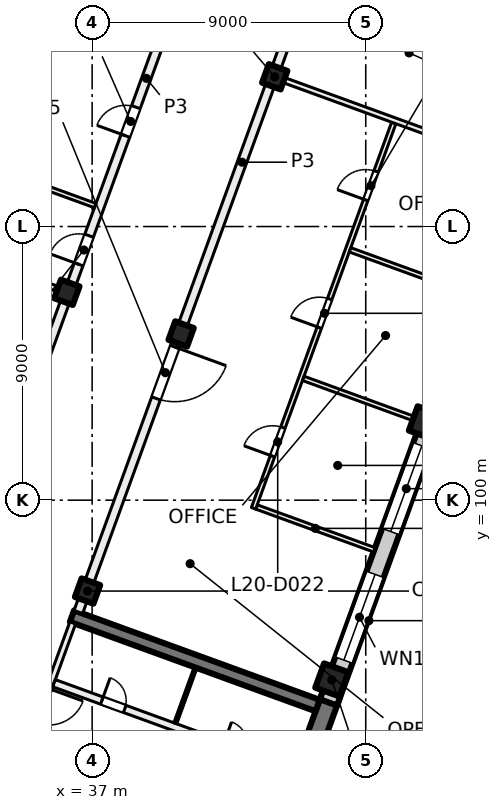
"""IFC4 building model, lengths in metres.
Left out: names, types, materials, properties, quantities, classifications, styles, units other than length and angle.
Written with IfcOpenShell. Run it as: python <this file> out.ifc"""

import sys

from ifc_helpers import new_model, si_unit, direction, frame, frame_2d, origin, origin_2d, place, context, subcontext, project, spatial, rectangle, extrude, element, fill, save


model = new_model("IFC4")
c1 = context("Model", 3, precision=1e-05, world=origin(), true_north=direction((0.0, 1.0)))
c2 = subcontext(c1, "Body", "Model", "MODEL_VIEW")
j1 = project(units=[si_unit("LENGTHUNIT", "METRE"), si_unit("PLANEANGLEUNIT", "RADIAN")], contexts=[c1])
p1 = place(None, origin())
s1 = spatial("IfcSite", under=j1, at=p1, CompositionType="ELEMENT")
p2 = place(p1, origin())
s2 = spatial("IfcBuilding", under=s1, at=p2, CompositionType="ELEMENT")
p3 = place(p2, frame((0.0, 0.0, 89.0)))
s3 = spatial("IfcBuildingStorey", under=s2, at=p3, CompositionType="ELEMENT", Elevation=89.0)
for number, where, z_axis, x_axis in (
    (1, (43.006, 113.925, 0.0), (0.0, 0.0, 1.0), (-0.342, -0.94, 0.0)),
    (2, (39.927, 105.468, 0.0), (0.0, 0.0, 1.0), (-0.342, -0.94, 0.0)),
    (3, (36.849, 97.011, 0.0), (0.0, 0.0, 1.0), (-0.342, -0.94, 0.0)),
    (4, (36.169, 106.836, 0.0), (0.0, 0.0, 1.0), (-0.342, -0.94, 0.0)),
):
    element("IfcColumn", number, at=place(p3, frame(where, z_axis=z_axis, x_axis=x_axis)), inside=s3, PredefinedType="COLUMN", context=c2, shape_type="SweptSolid", body=[
        extrude(rectangle(XDim=0.65, YDim=0.65, at=origin_2d()), origin(), (0.0, 0.0, 1.0), 4.0),
    ])
for number, where, z_axis, x_axis in (
    (5, (47.962, 102.544, 0.0), (0.0, 0.0, 1.0), (-0.342, -0.94, 0.0)),
    (6, (44.884, 94.087, 0.0), (0.0, 0.0, 1.0), (-0.342, -0.94, 0.0)),
):
    element("IfcColumn", number, at=place(p3, frame(where, z_axis=z_axis, x_axis=x_axis)), inside=s3, PredefinedType="COLUMN", context=c2, shape_type="SweptSolid", body=[
        extrude(rectangle(XDim=0.85, YDim=0.85, at=origin_2d()), origin(), (0.0, 0.0, 1.0), 4.0),
    ])
p4 = place(p3, frame((41.827, 85.249, 0.0), z_axis=(0.0, 0.0, 1.0), x_axis=(0.342017595281, 0.939693548195, 0.0)))
e7 = element("IfcWall", 7, at=p4, inside=s3, PredefinedType="SHEAR", context=c2, shape_type="SweptSolid", body=[
    extrude(rectangle(XDim=8.925, YDim=0.6, at=frame_2d((4.462, 0.0))), origin(), (0.0, 0.0, 1.0), 4.0),
])
p5 = place(p3, frame((44.418, 93.245, 0.0), z_axis=(0.0, 0.0, 1.0), x_axis=(-0.93969060187, 0.342025690201, 0.0)))
e8 = element("IfcWall", 8, at=p5, inside=s3, PredefinedType="SHEAR", context=c2, shape_type="SweptSolid", body=[
    extrude(rectangle(XDim=8.6, YDim=0.4, at=frame_2d((4.3, 0.0))), origin(), (0.0, 0.0, 1.0), 4.0),
])
p6 = place(p3, frame((52.212, 113.783, 0.0), z_axis=(0.0, 0.0, 1.0), x_axis=(-0.34202521188, -0.939690775968, 0.0)))
e9 = element("IfcWall", 9, at=p6, inside=s3, PredefinedType="SOLIDWALL", context=c2, shape_type="SweptSolid", body=[
    extrude(rectangle(XDim=21.745, YDim=0.6, at=frame_2d((10.873, 0.0))), origin(), (0.0, 0.0, 1.0), 3.625),
])
p7 = place(p6, frame((3.765, 0.0, 0.9)))
e10 = element("IfcOpeningElement", 10, at=p7, cuts=e9, PredefinedType="OPENING", context=c2, shape_type="SweptSolid", body=[
    extrude(rectangle(XDim=3.0, YDim=2.4, at=frame_2d((1.5, 1.2))), frame((0.0, 0.31, 0.0), z_axis=(0.0, -1.0, 0.0), x_axis=(1.0, 0.0, 0.0)), (0.0, 0.0, 1.0), 0.62),
])
p8 = place(p6, frame((8.265, 0.0, 0.9)))
e11 = element("IfcOpeningElement", 11, at=p8, cuts=e9, PredefinedType="OPENING", context=c2, shape_type="SweptSolid", body=[
    extrude(rectangle(XDim=3.0, YDim=2.4, at=frame_2d((1.5, 1.2))), frame((0.0, 0.31, 0.0), z_axis=(0.0, -1.0, 0.0), x_axis=(1.0, 0.0, 0.0)), (0.0, 0.0, 1.0), 0.62),
])
p9 = place(p6, frame((12.765, 0.0, 0.9)))
e12 = element("IfcOpeningElement", 12, at=p9, cuts=e9, PredefinedType="OPENING", context=c2, shape_type="SweptSolid", body=[
    extrude(rectangle(XDim=3.0, YDim=2.4, at=frame_2d((1.5, 1.2))), frame((0.0, 0.31, 0.0), z_axis=(0.0, -1.0, 0.0), x_axis=(1.0, 0.0, 0.0)), (0.0, 0.0, 1.0), 0.62),
])
p10 = place(p6, frame((17.265, 0.0, 0.9)))
e13 = element("IfcOpeningElement", 13, at=p10, cuts=e9, PredefinedType="OPENING", context=c2, shape_type="SweptSolid", body=[
    extrude(rectangle(XDim=3.0, YDim=2.4, at=frame_2d((1.5, 1.2))), frame((0.0, 0.31, 0.0), z_axis=(0.0, -1.0, 0.0), x_axis=(1.0, 0.0, 0.0)), (0.0, 0.0, 1.0), 0.62),
])
p11 = place(p3, frame((24.666, 100.669, 0.0), z_axis=(0.0, 0.0, 1.0), x_axis=(0.34201964167, 0.939692803373, 0.0)))
e14 = element("IfcWall", 14, at=p11, inside=s3, PredefinedType="SOLIDWALL", context=c2, shape_type="SweptSolid", body=[
    extrude(rectangle(XDim=32.884, YDim=0.6, at=frame_2d((16.442, 0.0))), origin(), (0.0, 0.0, 1.0), 3.625),
])
p12 = place(p11, frame((1.48, 0.0, 0.9)))
e15 = element("IfcOpeningElement", 15, at=p12, cuts=e14, PredefinedType="OPENING", context=c2, shape_type="SweptSolid", body=[
    extrude(rectangle(XDim=3.0, YDim=2.4, at=frame_2d((1.5, 1.2))), frame((0.0, 0.31, 0.0), z_axis=(0.0, -1.0, 0.0), x_axis=(1.0, 0.0, 0.0)), (0.0, 0.0, 1.0), 0.62),
])
p13 = place(p11, frame((5.98, 0.0, 0.9)))
e16 = element("IfcOpeningElement", 16, at=p13, cuts=e14, PredefinedType="OPENING", context=c2, shape_type="SweptSolid", body=[
    extrude(rectangle(XDim=3.0, YDim=2.4, at=frame_2d((1.5, 1.2))), frame((0.0, 0.31, 0.0), z_axis=(0.0, -1.0, 0.0), x_axis=(1.0, 0.0, 0.0)), (0.0, 0.0, 1.0), 0.62),
])
p14 = place(p11, frame((10.48, 0.0, 0.9)))
e17 = element("IfcOpeningElement", 17, at=p14, cuts=e14, PredefinedType="OPENING", context=c2, shape_type="SweptSolid", body=[
    extrude(rectangle(XDim=3.0, YDim=2.4, at=frame_2d((1.5, 1.2))), frame((0.0, 0.31, 0.0), z_axis=(0.0, -1.0, 0.0), x_axis=(1.0, 0.0, 0.0)), (0.0, 0.0, 1.0), 0.62),
])
p15 = place(p11, frame((14.98, 0.0, 0.9)))
e18 = element("IfcOpeningElement", 18, at=p15, cuts=e14, PredefinedType="OPENING", context=c2, shape_type="SweptSolid", body=[
    extrude(rectangle(XDim=3.0, YDim=2.4, at=frame_2d((1.5, 1.2))), frame((0.0, 0.31, 0.0), z_axis=(0.0, -1.0, 0.0), x_axis=(1.0, 0.0, 0.0)), (0.0, 0.0, 1.0), 0.62),
])
p16 = place(p11, frame((19.48, 0.0, 0.9)))
e19 = element("IfcOpeningElement", 19, at=p16, cuts=e14, PredefinedType="OPENING", context=c2, shape_type="SweptSolid", body=[
    extrude(rectangle(XDim=3.0, YDim=2.4, at=frame_2d((1.5, 1.2))), frame((0.0, 0.31, 0.0), z_axis=(0.0, -1.0, 0.0), x_axis=(1.0, 0.0, 0.0)), (0.0, 0.0, 1.0), 0.62),
])
p17 = place(p11, frame((23.98, 0.0, 0.9)))
e20 = element("IfcOpeningElement", 20, at=p17, cuts=e14, PredefinedType="OPENING", context=c2, shape_type="SweptSolid", body=[
    extrude(rectangle(XDim=3.0, YDim=2.4, at=frame_2d((1.5, 1.2))), frame((0.0, 0.31, 0.0), z_axis=(0.0, -1.0, 0.0), x_axis=(1.0, 0.0, 0.0)), (0.0, 0.0, 1.0), 0.62),
])
p18 = place(p11, frame((28.48, 0.0, 0.9)))
e21 = element("IfcOpeningElement", 21, at=p18, cuts=e14, PredefinedType="OPENING", context=c2, shape_type="SweptSolid", body=[
    extrude(rectangle(XDim=3.0, YDim=2.4, at=frame_2d((1.5, 1.2))), frame((0.0, 0.31, 0.0), z_axis=(0.0, -1.0, 0.0), x_axis=(1.0, 0.0, 0.0)), (0.0, 0.0, 1.0), 0.62),
])
p19 = place(p3, frame((36.362, 95.964, 0.0), z_axis=(0.0, 0.0, 1.0), x_axis=(-0.341995824804, -0.939701471648, 0.0)))
e22 = element("IfcWall", 22, at=p19, inside=s3, PredefinedType="PARTITIONING", context=c2, shape_type="SweptSolid", body=[
    extrude(rectangle(XDim=3.8, YDim=0.2, at=frame_2d((1.9, 0.0))), origin(), (0.0, 0.0, 1.0), 3.625),
])
p20 = place(p19, frame((2.3, 0.0, 0.0)))
e23 = element("IfcOpeningElement", 23, at=p20, cuts=e22, PredefinedType="OPENING", context=c2, shape_type="SweptSolid", body=[
    extrude(rectangle(XDim=1.2, YDim=2.1, at=frame_2d((0.6, 1.05))), frame((0.0, 0.11, 0.0), z_axis=(0.0, -1.0, 0.0), x_axis=(1.0, 0.0, 0.0)), (0.0, 0.0, 1.0), 0.22),
])
p21 = place(p3, frame((35.19, 92.453, 0.0), z_axis=(0.0, 0.0, 1.0), x_axis=(0.939691552312, -0.342023078919, 0.0)))
e24 = element("IfcWall", 24, at=p21, inside=s3, PredefinedType="PARTITIONING", context=c2, shape_type="SweptSolid", body=[
    extrude(rectangle(XDim=8.4, YDim=0.2, at=frame_2d((4.2, 0.0))), origin(), (0.0, 0.0, 1.0), 3.625),
])
p22 = place(p21, frame((5.25, 0.0, 0.0)))
e25 = element("IfcOpeningElement", 25, at=p22, cuts=e24, PredefinedType="OPENING", context=c2, shape_type="SweptSolid", body=[
    extrude(rectangle(XDim=1.5, YDim=2.1, at=frame_2d((0.75, 1.05))), frame((0.0, 0.11, 0.0), z_axis=(0.0, -1.0, 0.0), x_axis=(1.0, 0.0, 0.0)), (0.0, 0.0, 1.0), 0.22),
])
p23 = place(p3, frame((35.746, 93.98, 0.0), z_axis=(0.0, 0.0, 1.0), x_axis=(0.939691552312, -0.342023078919, 0.0)))
e26 = element("IfcWall", 26, at=p23, inside=s3, PredefinedType="PARTITIONING", context=c2, shape_type="SweptSolid", body=[
    extrude(rectangle(XDim=8.4, YDim=0.25, at=frame_2d((4.2, 0.0))), origin(), (0.0, 0.0, 1.0), 3.625),
])
p24 = place(p23, frame((1.675, 0.0, 0.0)))
e27 = element("IfcOpeningElement", 27, at=p24, cuts=e26, PredefinedType="OPENING", context=c2, shape_type="SweptSolid", body=[
    extrude(rectangle(XDim=0.8, YDim=2.1, at=frame_2d((0.4, 1.05))), frame((0.0, 0.135, 0.0), z_axis=(0.0, -1.0, 0.0), x_axis=(1.0, 0.0, 0.0)), (0.0, 0.0, 1.0), 0.27),
])
p25 = place(p23, frame((5.925, 0.0, 0.0)))
e28 = element("IfcOpeningElement", 28, at=p25, cuts=e26, PredefinedType="OPENING", context=c2, shape_type="SweptSolid", body=[
    extrude(rectangle(XDim=0.8, YDim=2.1, at=frame_2d((0.4, 1.05))), frame((0.0, 0.135, 0.0), z_axis=(0.0, -1.0, 0.0), x_axis=(1.0, 0.0, 0.0)), (0.0, 0.0, 1.0), 0.27),
])
p26 = place(p3, frame((40.403, 94.494, 0.0), z_axis=(0.0, 0.0, 1.0), x_axis=(-0.342064742067, -0.939676386973, 0.0)))
e29 = element("IfcWall", 29, at=p26, inside=s3, PredefinedType="PARTITIONING", context=c2, shape_type="SweptSolid", body=[
    extrude(rectangle(XDim=1.95, YDim=0.1, at=frame_2d((0.975, 0.0))), origin(), (0.0, 0.0, 1.0), 3.625),
])
p27 = place(p3, frame((32.63, 108.124, 0.0), z_axis=(0.0, 0.0, 1.0), x_axis=(0.939692277825, -0.342021085601, 0.0)))
e30 = element("IfcWall", 30, at=p27, inside=s3, PredefinedType="PARTITIONING", context=c2, shape_type="SweptSolid", body=[
    extrude(rectangle(XDim=3.666, YDim=0.175, at=frame_2d((1.833, 0.0))), origin(), (0.0, 0.0, 1.0), 3.625),
])
p28 = place(p3, frame((32.881, 97.657, 0.0), z_axis=(0.0, 0.0, 1.0), x_axis=(0.342017360004, 0.939693633828, 0.0)))
e31 = element("IfcWall", 31, at=p28, inside=s3, PredefinedType="PARTITIONING", context=c2, shape_type="SweptSolid", body=[
    extrude(rectangle(XDim=34.516, YDim=0.3, at=frame_2d((17.258, 0.0))), origin(), (0.0, 0.0, 1.0), 3.625),
])
p29 = place(p28, frame((4.275, 0.0, 0.0)))
e32 = element("IfcOpeningElement", 32, at=p29, cuts=e31, PredefinedType="OPENING", context=c2, shape_type="SweptSolid", body=[
    extrude(rectangle(XDim=1.2, YDim=2.1, at=frame_2d((0.6, 1.05))), frame((0.0, 0.16, 0.0), z_axis=(0.0, -1.0, 0.0), x_axis=(1.0, 0.0, 0.0)), (0.0, 0.0, 1.0), 0.32),
])
p30 = place(p28, frame((10.75, 0.0, 0.0)))
e33 = element("IfcOpeningElement", 33, at=p30, cuts=e31, PredefinedType="OPENING", context=c2, shape_type="SweptSolid", body=[
    extrude(rectangle(XDim=1.0, YDim=2.1, at=frame_2d((0.5, 1.05))), frame((0.0, 0.16, 0.0), z_axis=(0.0, -1.0, 0.0), x_axis=(1.0, 0.0, 0.0)), (0.0, 0.0, 1.0), 0.32),
])
p31 = place(p28, frame((15.25, 0.0, 0.0)))
e34 = element("IfcOpeningElement", 34, at=p31, cuts=e31, PredefinedType="OPENING", context=c2, shape_type="SweptSolid", body=[
    extrude(rectangle(XDim=1.0, YDim=2.1, at=frame_2d((0.5, 1.05))), frame((0.0, 0.16, 0.0), z_axis=(0.0, -1.0, 0.0), x_axis=(1.0, 0.0, 0.0)), (0.0, 0.0, 1.0), 0.32),
])
p32 = place(p28, frame((20.4, 0.0, 0.0)))
e35 = element("IfcOpeningElement", 35, at=p32, cuts=e31, PredefinedType="OPENING", context=c2, shape_type="SweptSolid", body=[
    extrude(rectangle(XDim=1.2, YDim=2.1, at=frame_2d((0.6, 1.05))), frame((0.0, 0.16, 0.0), z_axis=(0.0, -1.0, 0.0), x_axis=(1.0, 0.0, 0.0)), (0.0, 0.0, 1.0), 0.32),
])
p33 = place(p28, frame((25.0, 0.0, 0.0)))
e36 = element("IfcOpeningElement", 36, at=p33, cuts=e31, PredefinedType="OPENING", context=c2, shape_type="SweptSolid", body=[
    extrude(rectangle(XDim=1.0, YDim=2.1, at=frame_2d((0.5, 1.05))), frame((0.0, 0.16, 0.0), z_axis=(0.0, -1.0, 0.0), x_axis=(1.0, 0.0, 0.0)), (0.0, 0.0, 1.0), 0.32),
])
p34 = place(p3, frame((33.507, 110.998, 0.0), z_axis=(0.0, 0.0, 1.0), x_axis=(0.939610657605, -0.342245251415, 0.0)))
e37 = element("IfcWall", 37, at=p34, inside=s3, PredefinedType="PARTITIONING", context=c2, shape_type="SweptSolid", body=[
    extrude(rectangle(XDim=3.825, YDim=0.15, at=frame_2d((1.913, 0.0))), origin(), (0.0, 0.0, 1.0), 3.625),
])
p35 = place(p3, frame((46.282, 98.367, 0.0), z_axis=(0.0, 0.0, 1.0), x_axis=(-0.939765774653, 0.341819087808, 0.0)))
e38 = element("IfcWall", 38, at=p35, inside=s3, PredefinedType="PARTITIONING", context=c2, shape_type="SweptSolid", body=[
    extrude(rectangle(XDim=4.125, YDim=0.15, at=frame_2d((2.063, 0.0))), origin(), (0.0, 0.0, 1.0), 3.625),
])
p36 = place(p3, frame((42.309, 99.733, 0.0), z_axis=(0.0, 0.0, 1.0), x_axis=(0.342023551531, 0.939691380293, 0.0)))
e39 = element("IfcWall", 39, at=p36, inside=s3, PredefinedType="PARTITIONING", context=c2, shape_type="SweptSolid", body=[
    extrude(rectangle(XDim=13.488, YDim=0.15, at=frame_2d((6.744, 0.0))), origin(), (0.0, 0.0, 1.0), 3.625),
])
p37 = place(p36, frame((1.825, 0.0, 0.0)))
e40 = element("IfcOpeningElement", 40, at=p37, cuts=e39, PredefinedType="OPENING", context=c2, shape_type="SweptSolid", body=[
    extrude(rectangle(XDim=1.0, YDim=2.1, at=frame_2d((0.5, 1.05))), frame((0.0, 0.085, 0.0), z_axis=(0.0, -1.0, 0.0), x_axis=(1.0, 0.0, 0.0)), (0.0, 0.0, 1.0), 0.17),
])
p38 = place(p36, frame((6.325, 0.0, 0.0)))
e41 = element("IfcOpeningElement", 41, at=p38, cuts=e39, PredefinedType="OPENING", context=c2, shape_type="SweptSolid", body=[
    extrude(rectangle(XDim=1.0, YDim=2.1, at=frame_2d((0.5, 1.05))), frame((0.0, 0.085, 0.0), z_axis=(0.0, -1.0, 0.0), x_axis=(1.0, 0.0, 0.0)), (0.0, 0.0, 1.0), 0.17),
])
p39 = place(p36, frame((10.791, 0.0, 0.0)))
e42 = element("IfcOpeningElement", 42, at=p39, cuts=e39, PredefinedType="OPENING", context=c2, shape_type="SweptSolid", body=[
    extrude(rectangle(XDim=1.0, YDim=2.1, at=frame_2d((0.5, 1.05))), frame((0.0, 0.085, 0.0), z_axis=(0.0, -1.0, 0.0), x_axis=(1.0, 0.0, 0.0)), (0.0, 0.0, 1.0), 0.17),
])
p40 = place(p3, frame((43.1, 113.891, 0.0), z_axis=(0.0, 0.0, 1.0), x_axis=(0.939670544866, -0.342080790328, 0.0)))
e43 = element("IfcWall", 43, at=p40, inside=s3, PredefinedType="PARTITIONING", context=c2, shape_type="SweptSolid", body=[
    extrude(rectangle(XDim=8.3, YDim=0.175, at=frame_2d((4.15, 0.0))), origin(), (0.0, 0.0, 1.0), 3.625),
])
p41 = place(p3, frame((43.944, 104.006, 0.0), z_axis=(0.0, 0.0, 1.0), x_axis=(0.939689717042, -0.34202812119, 0.0)))
e44 = element("IfcWall", 44, at=p41, inside=s3, PredefinedType="PARTITIONING", context=c2, shape_type="SweptSolid", body=[
    extrude(rectangle(XDim=4.126, YDim=0.15, at=frame_2d((2.063, 0.0))), origin(), (0.0, 0.0, 1.0), 3.625),
])
p42 = place(p3, frame((45.483, 108.234, 0.0), z_axis=(0.0, 0.0, 1.0), x_axis=(0.939791695678, -0.341747814529, 0.0)))
e45 = element("IfcWall", 45, at=p42, inside=s3, PredefinedType="PARTITIONING", context=c2, shape_type="SweptSolid", body=[
    extrude(rectangle(XDim=4.125, YDim=0.15, at=frame_2d((2.063, 0.0))), origin(), (0.0, 0.0, 1.0), 3.625),
])
p43 = place(p3, frame((47.314, 125.909, 0.0), z_axis=(0.0, 0.0, 1.0), x_axis=(-0.342010770371, -0.939696032209, 0.0)))
e46 = element("IfcWall", 46, at=p43, inside=s3, PredefinedType="PARTITIONING", context=c2, shape_type="SweptSolid", body=[
    extrude(rectangle(XDim=31.485, YDim=0.3, at=frame_2d((15.742, 0.0))), origin(), (0.0, 0.0, 1.0), 3.625),
])
p44 = place(p43, frame((22.21, 0.0, 0.0)))
e47 = element("IfcOpeningElement", 47, at=p44, cuts=e46, PredefinedType="OPENING", context=c2, shape_type="SweptSolid", body=[
    extrude(rectangle(XDim=1.8, YDim=2.1, at=frame_2d((0.9, 1.05))), frame((0.0, 0.16, 0.0), z_axis=(0.0, -1.0, 0.0), x_axis=(1.0, 0.0, 0.0)), (0.0, 0.0, 1.0), 0.32),
])
p45 = place(p43, frame((9.885, 0.0, 0.0)))
e48 = element("IfcOpeningElement", 48, at=p45, cuts=e46, PredefinedType="OPENING", context=c2, shape_type="SweptSolid", body=[
    extrude(rectangle(XDim=1.2, YDim=2.1, at=frame_2d((0.6, 1.05))), frame((0.0, 0.16, 0.0), z_axis=(0.0, -1.0, 0.0), x_axis=(1.0, 0.0, 0.0)), (0.0, 0.0, 1.0), 0.32),
])
p46 = place(p43, frame((5.484, 0.0, 0.0)))
e49 = element("IfcOpeningElement", 49, at=p46, cuts=e46, PredefinedType="OPENING", context=c2, shape_type="SweptSolid", body=[
    extrude(rectangle(XDim=1.0, YDim=2.1, at=frame_2d((0.5, 1.05))), frame((0.0, 0.16, 0.0), z_axis=(0.0, -1.0, 0.0), x_axis=(1.0, 0.0, 0.0)), (0.0, 0.0, 1.0), 0.32),
])
p47 = place(p9, origin())
e50 = element("IfcWindow", 50, at=p47, inside=s3, PartitioningType="SINGLE_PANEL", PredefinedType="WINDOW", context=c2, shape_type="SweptSolid", body=[
    extrude(rectangle(XDim=3.0, YDim=2.4, at=frame_2d((1.5, 1.2))), frame((0.0, 0.03, 0.0), z_axis=(0.0, -1.0, 0.0), x_axis=(1.0, 0.0, 0.0)), (0.0, 0.0, 1.0), 0.06),
])
fill(e12, e50)
p48 = place(p10, origin())
e51 = element("IfcWindow", 51, at=p48, inside=s3, PartitioningType="SINGLE_PANEL", PredefinedType="WINDOW", context=c2, shape_type="SweptSolid", body=[
    extrude(rectangle(XDim=3.0, YDim=2.4, at=frame_2d((1.5, 1.2))), frame((0.0, 0.03, 0.0), z_axis=(0.0, -1.0, 0.0), x_axis=(1.0, 0.0, 0.0)), (0.0, 0.0, 1.0), 0.06),
])
fill(e13, e51)
p49 = place(p24, origin())
e52 = element("IfcDoor", 52, at=p49, inside=s3, OperationType="SINGLE_SWING_RIGHT", PredefinedType="DOOR", context=c2, shape_type="SweptSolid", body=[
    extrude(rectangle(XDim=0.8, YDim=2.1, at=frame_2d((0.4, 1.05))), frame((0.0, 0.025, 0.0), z_axis=(0.0, -1.0, 0.0), x_axis=(1.0, 0.0, 0.0)), (0.0, 0.0, 1.0), 0.05),
])
fill(e27, e52)
p50 = place(p30, origin())
e53 = element("IfcDoor", 53, at=p50, inside=s3, OperationType="SINGLE_SWING_RIGHT", PredefinedType="DOOR", context=c2, shape_type="SweptSolid", body=[
    extrude(rectangle(XDim=1.0, YDim=2.1, at=frame_2d((0.5, 1.05))), frame((0.0, 0.025, 0.0), z_axis=(0.0, -1.0, 0.0), x_axis=(1.0, 0.0, 0.0)), (0.0, 0.0, 1.0), 0.05),
])
fill(e33, e53)
p51 = place(p31, origin())
e54 = element("IfcDoor", 54, at=p51, inside=s3, OperationType="SINGLE_SWING_LEFT", PredefinedType="DOOR", context=c2, shape_type="SweptSolid", body=[
    extrude(rectangle(XDim=1.0, YDim=2.1, at=frame_2d((0.5, 1.05))), frame((0.0, 0.025, 0.0), z_axis=(0.0, -1.0, 0.0), x_axis=(1.0, 0.0, 0.0)), (0.0, 0.0, 1.0), 0.05),
])
fill(e34, e54)
p52 = place(p37, origin())
e55 = element("IfcDoor", 55, at=p52, inside=s3, OperationType="SINGLE_SWING_LEFT", PredefinedType="DOOR", context=c2, shape_type="SweptSolid", body=[
    extrude(rectangle(XDim=1.0, YDim=2.1, at=frame_2d((0.5, 1.05))), frame((0.0, 0.025, 0.0), z_axis=(0.0, -1.0, 0.0), x_axis=(1.0, 0.0, 0.0)), (0.0, 0.0, 1.0), 0.05),
])
fill(e40, e55)
p53 = place(p38, origin())
e56 = element("IfcDoor", 56, at=p53, inside=s3, OperationType="SINGLE_SWING_LEFT", PredefinedType="DOOR", context=c2, shape_type="SweptSolid", body=[
    extrude(rectangle(XDim=1.0, YDim=2.1, at=frame_2d((0.5, 1.05))), frame((0.0, 0.025, 0.0), z_axis=(0.0, -1.0, 0.0), x_axis=(1.0, 0.0, 0.0)), (0.0, 0.0, 1.0), 0.05),
])
fill(e41, e56)
p54 = place(p39, origin())
e57 = element("IfcDoor", 57, at=p54, inside=s3, OperationType="SINGLE_SWING_LEFT", PredefinedType="DOOR", context=c2, shape_type="SweptSolid", body=[
    extrude(rectangle(XDim=1.0, YDim=2.1, at=frame_2d((0.5, 1.05))), frame((0.0, 0.025, 0.0), z_axis=(0.0, -1.0, 0.0), x_axis=(1.0, 0.0, 0.0)), (0.0, 0.0, 1.0), 0.05),
])
fill(e42, e57)
p55 = place(p44, origin())
e58 = element("IfcDoor", 58, at=p55, inside=s3, OperationType="DOUBLE_DOOR_SINGLE_SWING", PredefinedType="DOOR", context=c2, shape_type="SweptSolid", body=[
    extrude(rectangle(XDim=1.8, YDim=2.1, at=frame_2d((0.9, 1.05))), frame((0.0, 0.025, 0.0), z_axis=(0.0, -1.0, 0.0), x_axis=(1.0, 0.0, 0.0)), (0.0, 0.0, 1.0), 0.05),
])
fill(e47, e58)
save(model, sys.argv[1])
